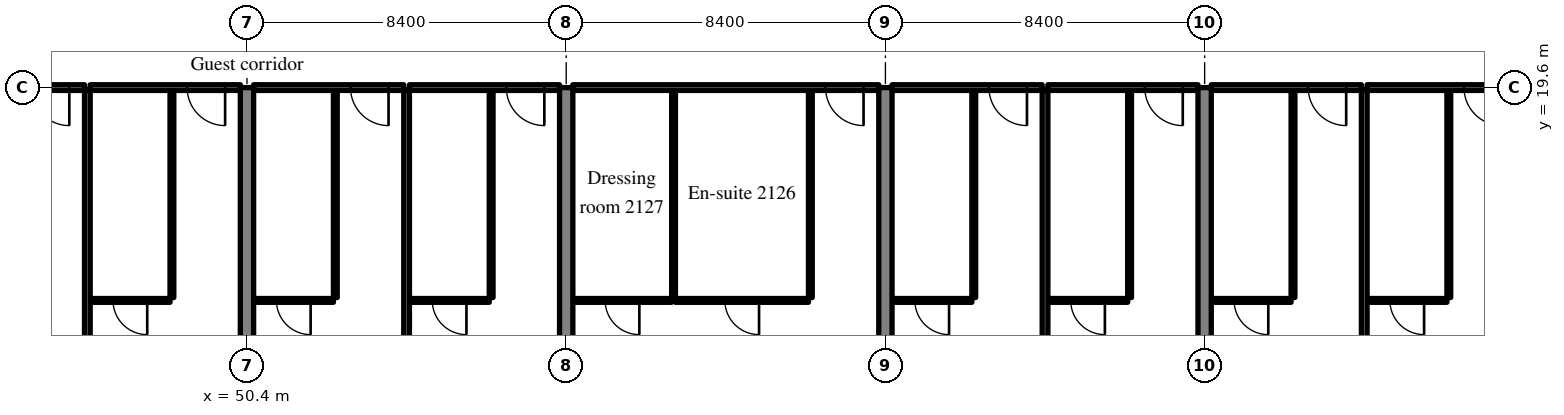
"""IFC4 building model, lengths in metres.
Left out: names, types, materials, properties, quantities, classifications, styles, units other than length and angle.
Written with IfcOpenShell. Run it as: python <this file> out.ifc"""

import sys

from ifc_helpers import new_model, si_unit, direction, frame, frame_2d, origin, place, context, subcontext, project, spatial, rectangle, extrude, source, transform, mapped, element, fill, save


model = new_model("IFC4")
c1 = context("Model", 3, precision=1e-05, world=origin(), true_north=direction((0.0, 1.0)))
c2 = subcontext(c1, "Body", "Model", "MODEL_VIEW")
j1 = project(units=[si_unit("LENGTHUNIT", "METRE"), si_unit("PLANEANGLEUNIT", "RADIAN")], contexts=[c1])
p1 = place(None, origin())
s1 = spatial("IfcSite", under=j1, at=p1, CompositionType="ELEMENT")
p2 = place(p1, origin())
s2 = spatial("IfcBuilding", under=s1, at=p2, CompositionType="ELEMENT")
p3 = place(p2, frame((0.0, 0.0, 91.4)))
s3 = spatial("IfcBuildingStorey", under=s2, at=p3, CompositionType="ELEMENT", Elevation=91.4)
m1 = source(origin(), c2, "Body", "SweptSolid", [
    extrude(rectangle(XDim=13.1, YDim=0.35, at=frame_2d((6.55, 0.0))), origin(), (0.0, 0.0, 1.0), 3.52),
])
p4 = place(p3, frame((50.4, 6.5, 0.0), z_axis=(0.0, 0.0, 1.0), x_axis=(0.0, 1.0, 0.0)))
e1 = element("IfcWall", 1, at=p4, inside=s3, PredefinedType="SHEAR", context=c2, shape_type="MappedRepresentation", body=[
    mapped(m1, transform((0.0, 0.0, 0.0), scale=1.0)),
])
m2 = source(origin(), c2, "Body", "SweptSolid", [
    extrude(rectangle(XDim=14.1, YDim=0.35, at=frame_2d((7.05, 0.0))), origin(), (0.0, 0.0, 1.0), 3.52),
])
for number, where, z_axis, x_axis in (
    (2, (58.8, 5.5, 0.0), (0.0, 0.0, 1.0), (0.0, 1.0, 0.0)),
    (3, (67.2, 5.5, 0.0), (0.0, 0.0, 1.0), (0.0, 1.0, 0.0)),
    (4, (75.6, 5.5, 0.0), (0.0, 0.0, 1.0), (0.0, 1.0, 0.0)),
):
    element("IfcWall", number, at=place(p3, frame(where, z_axis=z_axis, x_axis=x_axis)), inside=s3, PredefinedType="SHEAR", context=c2, shape_type="MappedRepresentation", body=[
        mapped(m2, transform((0.0, 0.0, 0.0), scale=1.0)),
    ])
m3 = source(origin(), c2, "Body", "SweptSolid", [
    extrude(rectangle(XDim=3.95, YDim=0.15, at=frame_2d((1.975, 0.0))), origin(), (0.0, 0.0, 1.0), 2.82),
])
p5 = place(p3, frame((42.175, 19.6, 0.0), z_axis=(0.0, 0.0, 1.0), x_axis=(1.0, 0.0, 0.0)))
e5 = element("IfcWall", 5, at=p5, inside=s3, PredefinedType="PARTITIONING", context=c2, shape_type="MappedRepresentation", body=[
    mapped(m3, transform((0.0, 0.0, 0.0), scale=1.0)),
])
m4 = source(origin(), c2, "Body", "SweptSolid", [
    extrude(rectangle(XDim=1.0, YDim=2.1, at=frame_2d((0.5, 1.05))), frame((0.0, 0.085, 0.0), z_axis=(0.0, -1.0, 0.0), x_axis=(1.0, 0.0, 0.0)), (0.0, 0.0, 1.0), 0.17),
])
p6 = place(p5, frame((2.55, 0.0, 0.0)))
e6 = element("IfcOpeningElement", 6, at=p6, cuts=e5, PredefinedType="OPENING", context=c2, shape_type="MappedRepresentation", body=[
    mapped(m4, transform((0.0, 0.0, 0.0), scale=1.0)),
])
m5 = source(origin(), c2, "Body", "SweptSolid", [
    extrude(rectangle(XDim=5.45, YDim=0.1, at=frame_2d((2.725, 0.0))), origin(), (0.0, 0.0, 1.0), 3.52),
])
p7 = place(p3, frame((48.425, 14.075, 0.0), z_axis=(0.0, 0.0, 1.0), x_axis=(0.0, 1.0, 0.0)))
e7 = element("IfcWall", 7, at=p7, inside=s3, PredefinedType="PARTITIONING", context=c2, shape_type="MappedRepresentation", body=[
    mapped(m5, transform((0.0, 0.0, 0.0), scale=1.0)),
])
m6 = source(origin(), c2, "Body", "SweptSolid", [
    extrude(rectangle(XDim=2.1, YDim=0.1, at=frame_2d((1.05, 0.0))), origin(), (0.0, 0.0, 1.0), 3.52),
])
p8 = place(p3, frame((46.275, 14.0, 0.0), z_axis=(0.0, 0.0, 1.0), x_axis=(1.0, 0.0, 0.0)))
e8 = element("IfcWall", 8, at=p8, inside=s3, PredefinedType="PARTITIONING", context=c2, shape_type="MappedRepresentation", body=[
    mapped(m6, transform((0.0, 0.0, 0.0), scale=1.0)),
])
m7 = source(origin(), c2, "Body", "SweptSolid", [
    extrude(rectangle(XDim=0.9, YDim=2.1, at=frame_2d((0.45, 1.05))), frame((0.0, 0.06, 0.0), z_axis=(0.0, -1.0, 0.0), x_axis=(1.0, 0.0, 0.0)), (0.0, 0.0, 1.0), 0.12),
])
p9 = place(p8, frame((0.6, 0.0, 0.0)))
e9 = element("IfcOpeningElement", 9, at=p9, cuts=e8, PredefinedType="OPENING", context=c2, shape_type="MappedRepresentation", body=[
    mapped(m7, transform((0.0, 0.0, 0.0), scale=1.0)),
])
m8 = source(origin(), c2, "Body", "SweptSolid", [
    extrude(rectangle(XDim=3.95, YDim=0.15, at=frame_2d((1.975, 0.0))), origin(), (0.0, 0.0, 1.0), 2.82),
])
p10 = place(p3, frame((46.275, 19.6, 0.0), z_axis=(0.0, 0.0, 1.0), x_axis=(1.0, 0.0, 0.0)))
e10 = element("IfcWall", 10, at=p10, inside=s3, PredefinedType="PARTITIONING", context=c2, shape_type="MappedRepresentation", body=[
    mapped(m8, transform((0.0, 0.0, 0.0), scale=1.0)),
])
p11 = place(p10, frame((2.55, 0.0, 0.0)))
e11 = element("IfcOpeningElement", 11, at=p11, cuts=e10, PredefinedType="OPENING", context=c2, shape_type="MappedRepresentation", body=[
    mapped(m4, transform((0.0, 0.0, 0.0), scale=1.0)),
])
m9 = source(origin(), c2, "Body", "SweptSolid", [
    extrude(rectangle(XDim=14.906, YDim=0.15, at=frame_2d((7.453, 0.0))), origin(), (0.0, 0.0, 1.0), 3.52),
])
p12 = place(p3, frame((46.2, 4.619, 0.0), z_axis=(0.0, 0.0, 1.0), x_axis=(0.0, 1.0, 0.0)))
e12 = element("IfcWall", 12, at=p12, inside=s3, PredefinedType="PARTITIONING", context=c2, shape_type="MappedRepresentation", body=[
    mapped(m9, transform((0.0, 0.0, 0.0), scale=1.0)),
])
p13 = place(p3, frame((52.725, 14.075, 0.0), z_axis=(0.0, 0.0, 1.0), x_axis=(0.0, 1.0, 0.0)))
e13 = element("IfcWall", 13, at=p13, inside=s3, PredefinedType="PARTITIONING", context=c2, shape_type="MappedRepresentation", body=[
    mapped(m5, transform((0.0, 0.0, 0.0), scale=1.0)),
])
p14 = place(p3, frame((50.575, 14.0, 0.0), z_axis=(0.0, 0.0, 1.0), x_axis=(1.0, 0.0, 0.0)))
e14 = element("IfcWall", 14, at=p14, inside=s3, PredefinedType="PARTITIONING", context=c2, shape_type="MappedRepresentation", body=[
    mapped(m6, transform((0.0, 0.0, 0.0), scale=1.0)),
])
p15 = place(p14, frame((0.6, 0.0, 0.0)))
e15 = element("IfcOpeningElement", 15, at=p15, cuts=e14, PredefinedType="OPENING", context=c2, shape_type="MappedRepresentation", body=[
    mapped(m7, transform((0.0, 0.0, 0.0), scale=1.0)),
])
p16 = place(p3, frame((50.575, 19.6, 0.0), z_axis=(0.0, 0.0, 1.0), x_axis=(1.0, 0.0, 0.0)))
e16 = element("IfcWall", 16, at=p16, inside=s3, PredefinedType="PARTITIONING", context=c2, shape_type="MappedRepresentation", body=[
    mapped(m3, transform((0.0, 0.0, 0.0), scale=1.0)),
])
p17 = place(p16, frame((2.55, 0.0, 0.0)))
e17 = element("IfcOpeningElement", 17, at=p17, cuts=e16, PredefinedType="OPENING", context=c2, shape_type="MappedRepresentation", body=[
    mapped(m4, transform((0.0, 0.0, 0.0), scale=1.0)),
])
p18 = place(p3, frame((56.825, 14.075, 0.0), z_axis=(0.0, 0.0, 1.0), x_axis=(0.0, 1.0, 0.0)))
e18 = element("IfcWall", 18, at=p18, inside=s3, PredefinedType="PARTITIONING", context=c2, shape_type="MappedRepresentation", body=[
    mapped(m5, transform((0.0, 0.0, 0.0), scale=1.0)),
])
m10 = source(origin(), c2, "Body", "SweptSolid", [
    extrude(rectangle(XDim=2.1, YDim=0.1, at=frame_2d((1.05, 0.0))), origin(), (0.0, 0.0, 1.0), 3.52),
])
p19 = place(p3, frame((54.675, 14.0, 0.0), z_axis=(0.0, 0.0, 1.0), x_axis=(1.0, 0.0, 0.0)))
e19 = element("IfcWall", 19, at=p19, inside=s3, PredefinedType="PARTITIONING", context=c2, shape_type="MappedRepresentation", body=[
    mapped(m10, transform((0.0, 0.0, 0.0), scale=1.0)),
])
p20 = place(p19, frame((0.6, 0.0, 0.0)))
e20 = element("IfcOpeningElement", 20, at=p20, cuts=e19, PredefinedType="OPENING", context=c2, shape_type="MappedRepresentation", body=[
    mapped(m7, transform((0.0, 0.0, 0.0), scale=1.0)),
])
p21 = place(p3, frame((54.675, 19.6, 0.0), z_axis=(0.0, 0.0, 1.0), x_axis=(1.0, 0.0, 0.0)))
e21 = element("IfcWall", 21, at=p21, inside=s3, PredefinedType="PARTITIONING", context=c2, shape_type="MappedRepresentation", body=[
    mapped(m3, transform((0.0, 0.0, 0.0), scale=1.0)),
])
p22 = place(p21, frame((2.55, 0.0, 0.0)))
e22 = element("IfcOpeningElement", 22, at=p22, cuts=e21, PredefinedType="OPENING", context=c2, shape_type="MappedRepresentation", body=[
    mapped(m4, transform((0.0, 0.0, 0.0), scale=1.0)),
])
p23 = place(p3, frame((54.6, 4.619, 0.0), z_axis=(0.0, 0.0, 1.0), x_axis=(0.0, 1.0, 0.0)))
e23 = element("IfcWall", 23, at=p23, inside=s3, PredefinedType="PARTITIONING", context=c2, shape_type="MappedRepresentation", body=[
    mapped(m9, transform((0.0, 0.0, 0.0), scale=1.0)),
])
for number, where, z_axis, x_axis in (
    (24, (65.225, 14.075, 0.0), (0.0, 0.0, 1.0), (0.0, 1.0, 0.0)),
    (25, (61.625, 14.075, 0.0), (0.0, 0.0, 1.0), (0.0, 1.0, 0.0)),
):
    element("IfcWall", number, at=place(p3, frame(where, z_axis=z_axis, x_axis=x_axis)), inside=s3, PredefinedType="PARTITIONING", context=c2, shape_type="MappedRepresentation", body=[
        mapped(m5, transform((0.0, 0.0, 0.0), scale=1.0)),
    ])
m11 = source(origin(), c2, "Body", "SweptSolid", [
    extrude(rectangle(XDim=3.5, YDim=0.1, at=frame_2d((1.75, 0.0))), origin(), (0.0, 0.0, 1.0), 3.52),
])
p24 = place(p3, frame((61.675, 14.0, 0.0), z_axis=(0.0, 0.0, 1.0), x_axis=(1.0, 0.0, 0.0)))
e26 = element("IfcWall", 26, at=p24, inside=s3, PredefinedType="PARTITIONING", context=c2, shape_type="MappedRepresentation", body=[
    mapped(m11, transform((0.0, 0.0, 0.0), scale=1.0)),
])
p25 = place(p24, frame((1.3, 0.0, 0.0)))
e27 = element("IfcOpeningElement", 27, at=p25, cuts=e26, PredefinedType="OPENING", context=c2, shape_type="MappedRepresentation", body=[
    mapped(m7, transform((0.0, 0.0, 0.0), scale=1.0)),
])
m12 = source(origin(), c2, "Body", "SweptSolid", [
    extrude(rectangle(XDim=2.6, YDim=0.1, at=frame_2d((1.3, 0.0))), origin(), (0.0, 0.0, 1.0), 3.52),
])
p26 = place(p3, frame((58.975, 14.0, 0.0), z_axis=(0.0, 0.0, 1.0), x_axis=(1.0, 0.0, 0.0)))
e28 = element("IfcWall", 28, at=p26, inside=s3, PredefinedType="PARTITIONING", context=c2, shape_type="MappedRepresentation", body=[
    mapped(m12, transform((0.0, 0.0, 0.0), scale=1.0)),
])
p27 = place(p26, frame((0.85, 0.0, 0.0)))
e29 = element("IfcOpeningElement", 29, at=p27, cuts=e28, PredefinedType="OPENING", context=c2, shape_type="MappedRepresentation", body=[
    mapped(m7, transform((0.0, 0.0, 0.0), scale=1.0)),
])
m13 = source(origin(), c2, "Body", "SweptSolid", [
    extrude(rectangle(XDim=8.05, YDim=0.15, at=frame_2d((4.025, 0.0))), origin(), (0.0, 0.0, 1.0), 2.82),
])
p28 = place(p3, frame((58.975, 19.6, 0.0), z_axis=(0.0, 0.0, 1.0), x_axis=(1.0, 0.0, 0.0)))
e30 = element("IfcWall", 30, at=p28, inside=s3, PredefinedType="PARTITIONING", context=c2, shape_type="MappedRepresentation", body=[
    mapped(m13, transform((0.0, 0.0, 0.0), scale=1.0)),
])
p29 = place(p28, frame((6.65, 0.0, 0.0)))
e31 = element("IfcOpeningElement", 31, at=p29, cuts=e30, PredefinedType="OPENING", context=c2, shape_type="MappedRepresentation", body=[
    mapped(m4, transform((0.0, 0.0, 0.0), scale=1.0)),
])
p30 = place(p3, frame((69.525, 14.075, 0.0), z_axis=(0.0, 0.0, 1.0), x_axis=(0.0, 1.0, 0.0)))
e32 = element("IfcWall", 32, at=p30, inside=s3, PredefinedType="PARTITIONING", context=c2, shape_type="MappedRepresentation", body=[
    mapped(m5, transform((0.0, 0.0, 0.0), scale=1.0)),
])
p31 = place(p3, frame((67.375, 14.0, 0.0), z_axis=(0.0, 0.0, 1.0), x_axis=(1.0, 0.0, 0.0)))
e33 = element("IfcWall", 33, at=p31, inside=s3, PredefinedType="PARTITIONING", context=c2, shape_type="MappedRepresentation", body=[
    mapped(m6, transform((0.0, 0.0, 0.0), scale=1.0)),
])
p32 = place(p31, frame((0.6, 0.0, 0.0)))
e34 = element("IfcOpeningElement", 34, at=p32, cuts=e33, PredefinedType="OPENING", context=c2, shape_type="MappedRepresentation", body=[
    mapped(m7, transform((0.0, 0.0, 0.0), scale=1.0)),
])
p33 = place(p3, frame((67.375, 19.6, 0.0), z_axis=(0.0, 0.0, 1.0), x_axis=(1.0, 0.0, 0.0)))
e35 = element("IfcWall", 35, at=p33, inside=s3, PredefinedType="PARTITIONING", context=c2, shape_type="MappedRepresentation", body=[
    mapped(m3, transform((0.0, 0.0, 0.0), scale=1.0)),
])
p34 = place(p33, frame((2.55, 0.0, 0.0)))
e36 = element("IfcOpeningElement", 36, at=p34, cuts=e35, PredefinedType="OPENING", context=c2, shape_type="MappedRepresentation", body=[
    mapped(m4, transform((0.0, 0.0, 0.0), scale=1.0)),
])
p35 = place(p3, frame((73.625, 14.075, 0.0), z_axis=(0.0, 0.0, 1.0), x_axis=(0.0, 1.0, 0.0)))
e37 = element("IfcWall", 37, at=p35, inside=s3, PredefinedType="PARTITIONING", context=c2, shape_type="MappedRepresentation", body=[
    mapped(m5, transform((0.0, 0.0, 0.0), scale=1.0)),
])
p36 = place(p3, frame((71.475, 14.0, 0.0), z_axis=(0.0, 0.0, 1.0), x_axis=(1.0, 0.0, 0.0)))
e38 = element("IfcWall", 38, at=p36, inside=s3, PredefinedType="PARTITIONING", context=c2, shape_type="MappedRepresentation", body=[
    mapped(m10, transform((0.0, 0.0, 0.0), scale=1.0)),
])
p37 = place(p36, frame((0.6, 0.0, 0.0)))
e39 = element("IfcOpeningElement", 39, at=p37, cuts=e38, PredefinedType="OPENING", context=c2, shape_type="MappedRepresentation", body=[
    mapped(m7, transform((0.0, 0.0, 0.0), scale=1.0)),
])
p38 = place(p3, frame((71.475, 19.6, 0.0), z_axis=(0.0, 0.0, 1.0), x_axis=(1.0, 0.0, 0.0)))
e40 = element("IfcWall", 40, at=p38, inside=s3, PredefinedType="PARTITIONING", context=c2, shape_type="MappedRepresentation", body=[
    mapped(m3, transform((0.0, 0.0, 0.0), scale=1.0)),
])
p39 = place(p38, frame((2.55, 0.0, 0.0)))
e41 = element("IfcOpeningElement", 41, at=p39, cuts=e40, PredefinedType="OPENING", context=c2, shape_type="MappedRepresentation", body=[
    mapped(m4, transform((0.0, 0.0, 0.0), scale=1.0)),
])
m14 = source(origin(), c2, "Body", "SweptSolid", [
    extrude(rectangle(XDim=12.275, YDim=0.15, at=frame_2d((6.137, 0.0))), origin(), (0.0, 0.0, 1.0), 3.52),
])
p40 = place(p3, frame((71.4, 7.25, 0.0), z_axis=(0.0, 0.0, 1.0), x_axis=(0.0, 1.0, 0.0)))
e42 = element("IfcWall", 42, at=p40, inside=s3, PredefinedType="PARTITIONING", context=c2, shape_type="MappedRepresentation", body=[
    mapped(m14, transform((0.0, 0.0, 0.0), scale=1.0)),
])
p41 = place(p3, frame((77.925, 14.075, 0.0), z_axis=(0.0, 0.0, 1.0), x_axis=(0.0, 1.0, 0.0)))
e43 = element("IfcWall", 43, at=p41, inside=s3, PredefinedType="PARTITIONING", context=c2, shape_type="MappedRepresentation", body=[
    mapped(m5, transform((0.0, 0.0, 0.0), scale=1.0)),
])
p42 = place(p3, frame((75.775, 14.0, 0.0), z_axis=(0.0, 0.0, 1.0), x_axis=(1.0, 0.0, 0.0)))
e44 = element("IfcWall", 44, at=p42, inside=s3, PredefinedType="PARTITIONING", context=c2, shape_type="MappedRepresentation", body=[
    mapped(m6, transform((0.0, 0.0, 0.0), scale=1.0)),
])
p43 = place(p42, frame((0.6, 0.0, 0.0)))
e45 = element("IfcOpeningElement", 45, at=p43, cuts=e44, PredefinedType="OPENING", context=c2, shape_type="MappedRepresentation", body=[
    mapped(m7, transform((0.0, 0.0, 0.0), scale=1.0)),
])
p44 = place(p3, frame((75.775, 19.6, 0.0), z_axis=(0.0, 0.0, 1.0), x_axis=(1.0, 0.0, 0.0)))
e46 = element("IfcWall", 46, at=p44, inside=s3, PredefinedType="PARTITIONING", context=c2, shape_type="MappedRepresentation", body=[
    mapped(m8, transform((0.0, 0.0, 0.0), scale=1.0)),
])
p45 = place(p44, frame((2.55, 0.0, 0.0)))
e47 = element("IfcOpeningElement", 47, at=p45, cuts=e46, PredefinedType="OPENING", context=c2, shape_type="MappedRepresentation", body=[
    mapped(m4, transform((0.0, 0.0, 0.0), scale=1.0)),
])
p46 = place(p3, frame((82.025, 14.075, 0.0), z_axis=(0.0, 0.0, 1.0), x_axis=(0.0, 1.0, 0.0)))
e48 = element("IfcWall", 48, at=p46, inside=s3, PredefinedType="PARTITIONING", context=c2, shape_type="MappedRepresentation", body=[
    mapped(m5, transform((0.0, 0.0, 0.0), scale=1.0)),
])
p47 = place(p3, frame((79.875, 14.0, 0.0), z_axis=(0.0, 0.0, 1.0), x_axis=(1.0, 0.0, 0.0)))
e49 = element("IfcWall", 49, at=p47, inside=s3, PredefinedType="PARTITIONING", context=c2, shape_type="MappedRepresentation", body=[
    mapped(m6, transform((0.0, 0.0, 0.0), scale=1.0)),
])
p48 = place(p47, frame((0.6, 0.0, 0.0)))
e50 = element("IfcOpeningElement", 50, at=p48, cuts=e49, PredefinedType="OPENING", context=c2, shape_type="MappedRepresentation", body=[
    mapped(m7, transform((0.0, 0.0, 0.0), scale=1.0)),
])
p49 = place(p3, frame((79.875, 19.6, 0.0), z_axis=(0.0, 0.0, 1.0), x_axis=(1.0, 0.0, 0.0)))
e51 = element("IfcWall", 51, at=p49, inside=s3, PredefinedType="PARTITIONING", context=c2, shape_type="MappedRepresentation", body=[
    mapped(m3, transform((0.0, 0.0, 0.0), scale=1.0)),
])
p50 = place(p49, frame((2.55, 0.0, 0.0)))
e52 = element("IfcOpeningElement", 52, at=p50, cuts=e51, PredefinedType="OPENING", context=c2, shape_type="MappedRepresentation", body=[
    mapped(m4, transform((0.0, 0.0, 0.0), scale=1.0)),
])
p51 = place(p3, frame((79.8, 7.25, 0.0), z_axis=(0.0, 0.0, 1.0), x_axis=(0.0, 1.0, 0.0)))
e53 = element("IfcWall", 53, at=p51, inside=s3, PredefinedType="PARTITIONING", context=c2, shape_type="MappedRepresentation", body=[
    mapped(m14, transform((0.0, 0.0, 0.0), scale=1.0)),
])
m15 = source(origin(), c2, "Body", "SweptSolid", [
    extrude(rectangle(XDim=1.0, YDim=2.1, at=frame_2d((0.5, 1.05))), frame((0.0, 0.025, 0.0), z_axis=(0.0, -1.0, 0.0), x_axis=(1.0, 0.0, 0.0)), (0.0, 0.0, 1.0), 0.05),
])
p52 = place(p6, origin())
e54 = element("IfcDoor", 54, at=p52, inside=s3, OperationType="SINGLE_SWING_RIGHT", PredefinedType="DOOR", context=c2, shape_type="MappedRepresentation", body=[
    mapped(m15, transform((0.0, 0.0, 0.0), scale=1.0)),
])
fill(e6, e54)
m16 = source(origin(), c2, "Body", "SweptSolid", [
    extrude(rectangle(XDim=0.9, YDim=2.1, at=frame_2d((0.45, 1.05))), frame((0.0, 0.025, 0.0), z_axis=(0.0, -1.0, 0.0), x_axis=(1.0, 0.0, 0.0)), (0.0, 0.0, 1.0), 0.05),
])
p53 = place(p9, origin())
e55 = element("IfcDoor", 55, at=p53, inside=s3, OperationType="SINGLE_SWING_RIGHT", PredefinedType="DOOR", context=c2, shape_type="MappedRepresentation", body=[
    mapped(m16, transform((0.0, 0.0, 0.0), scale=1.0)),
])
fill(e9, e55)
p54 = place(p11, origin())
e56 = element("IfcDoor", 56, at=p54, inside=s3, OperationType="SINGLE_SWING_RIGHT", PredefinedType="DOOR", context=c2, shape_type="MappedRepresentation", body=[
    mapped(m15, transform((0.0, 0.0, 0.0), scale=1.0)),
])
fill(e11, e56)
p55 = place(p15, origin())
e57 = element("IfcDoor", 57, at=p55, inside=s3, OperationType="SINGLE_SWING_RIGHT", PredefinedType="DOOR", context=c2, shape_type="MappedRepresentation", body=[
    mapped(m16, transform((0.0, 0.0, 0.0), scale=1.0)),
])
fill(e15, e57)
p56 = place(p17, origin())
e58 = element("IfcDoor", 58, at=p56, inside=s3, OperationType="SINGLE_SWING_RIGHT", PredefinedType="DOOR", context=c2, shape_type="MappedRepresentation", body=[
    mapped(m15, transform((0.0, 0.0, 0.0), scale=1.0)),
])
fill(e17, e58)
p57 = place(p20, origin())
e59 = element("IfcDoor", 59, at=p57, inside=s3, OperationType="SINGLE_SWING_RIGHT", PredefinedType="DOOR", context=c2, shape_type="MappedRepresentation", body=[
    mapped(m16, transform((0.0, 0.0, 0.0), scale=1.0)),
])
fill(e20, e59)
p58 = place(p22, origin())
e60 = element("IfcDoor", 60, at=p58, inside=s3, OperationType="SINGLE_SWING_RIGHT", PredefinedType="DOOR", context=c2, shape_type="MappedRepresentation", body=[
    mapped(m15, transform((0.0, 0.0, 0.0), scale=1.0)),
])
fill(e22, e60)
p59 = place(p25, origin())
e61 = element("IfcDoor", 61, at=p59, inside=s3, OperationType="SINGLE_SWING_RIGHT", PredefinedType="DOOR", context=c2, shape_type="MappedRepresentation", body=[
    mapped(m16, transform((0.0, 0.0, 0.0), scale=1.0)),
])
fill(e27, e61)
p60 = place(p27, origin())
e62 = element("IfcDoor", 62, at=p60, inside=s3, OperationType="SINGLE_SWING_RIGHT", PredefinedType="DOOR", context=c2, shape_type="MappedRepresentation", body=[
    mapped(m16, transform((0.0, 0.0, 0.0), scale=1.0)),
])
fill(e29, e62)
p61 = place(p29, origin())
e63 = element("IfcDoor", 63, at=p61, inside=s3, OperationType="SINGLE_SWING_RIGHT", PredefinedType="DOOR", context=c2, shape_type="MappedRepresentation", body=[
    mapped(m15, transform((0.0, 0.0, 0.0), scale=1.0)),
])
fill(e31, e63)
p62 = place(p32, origin())
e64 = element("IfcDoor", 64, at=p62, inside=s3, OperationType="SINGLE_SWING_RIGHT", PredefinedType="DOOR", context=c2, shape_type="MappedRepresentation", body=[
    mapped(m16, transform((0.0, 0.0, 0.0), scale=1.0)),
])
fill(e34, e64)
p63 = place(p34, origin())
e65 = element("IfcDoor", 65, at=p63, inside=s3, OperationType="SINGLE_SWING_RIGHT", PredefinedType="DOOR", context=c2, shape_type="MappedRepresentation", body=[
    mapped(m15, transform((0.0, 0.0, 0.0), scale=1.0)),
])
fill(e36, e65)
p64 = place(p37, origin())
e66 = element("IfcDoor", 66, at=p64, inside=s3, OperationType="SINGLE_SWING_RIGHT", PredefinedType="DOOR", context=c2, shape_type="MappedRepresentation", body=[
    mapped(m16, transform((0.0, 0.0, 0.0), scale=1.0)),
])
fill(e39, e66)
p65 = place(p39, origin())
e67 = element("IfcDoor", 67, at=p65, inside=s3, OperationType="SINGLE_SWING_RIGHT", PredefinedType="DOOR", context=c2, shape_type="MappedRepresentation", body=[
    mapped(m15, transform((0.0, 0.0, 0.0), scale=1.0)),
])
fill(e41, e67)
p66 = place(p43, origin())
e68 = element("IfcDoor", 68, at=p66, inside=s3, OperationType="SINGLE_SWING_RIGHT", PredefinedType="DOOR", context=c2, shape_type="MappedRepresentation", body=[
    mapped(m16, transform((0.0, 0.0, 0.0), scale=1.0)),
])
fill(e45, e68)
p67 = place(p45, origin())
e69 = element("IfcDoor", 69, at=p67, inside=s3, OperationType="SINGLE_SWING_RIGHT", PredefinedType="DOOR", context=c2, shape_type="MappedRepresentation", body=[
    mapped(m15, transform((0.0, 0.0, 0.0), scale=1.0)),
])
fill(e47, e69)
p68 = place(p48, origin())
e70 = element("IfcDoor", 70, at=p68, inside=s3, OperationType="SINGLE_SWING_RIGHT", PredefinedType="DOOR", context=c2, shape_type="MappedRepresentation", body=[
    mapped(m16, transform((0.0, 0.0, 0.0), scale=1.0)),
])
fill(e50, e70)
p69 = place(p50, origin())
e71 = element("IfcDoor", 71, at=p69, inside=s3, OperationType="SINGLE_SWING_RIGHT", PredefinedType="DOOR", context=c2, shape_type="MappedRepresentation", body=[
    mapped(m15, transform((0.0, 0.0, 0.0), scale=1.0)),
])
fill(e52, e71)
save(model, sys.argv[1])
